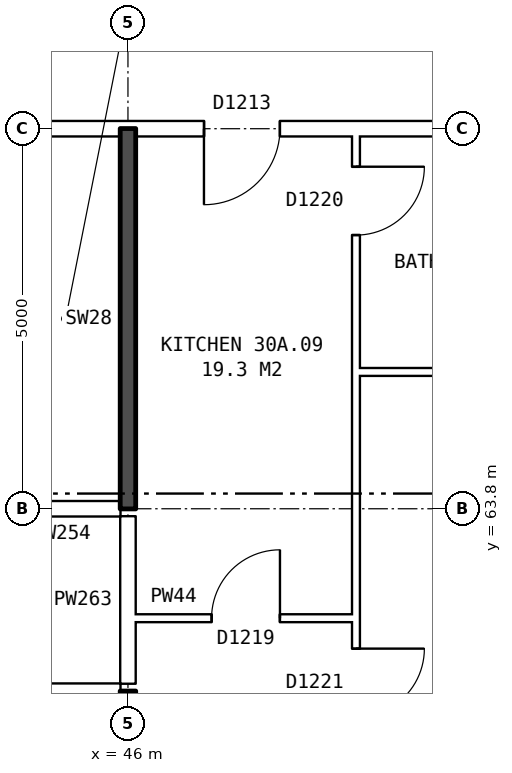
"""IFC4 building model, lengths in metres.
Left out: names, types, materials, properties, quantities, classifications, styles, units other than length and angle.
Written with IfcOpenShell. Run it as: python <this file> out.ifc"""

import sys

from ifc_helpers import new_model, si_unit, direction, frame, frame_2d, origin, place, context, subcontext, project, spatial, rectangle, extrude, element, fill, save


model = new_model("IFC4")
c1 = context("Model", 3, precision=1e-05, world=origin(), true_north=direction((0.0, 1.0)))
c2 = subcontext(c1, "Body", "Model", "MODEL_VIEW")
j1 = project(units=[si_unit("LENGTHUNIT", "METRE"), si_unit("PLANEANGLEUNIT", "RADIAN")], contexts=[c1])
p1 = place(None, origin())
s1 = spatial("IfcSite", under=j1, at=p1, CompositionType="ELEMENT")
p2 = place(p1, origin())
s2 = spatial("IfcBuilding", under=s1, at=p2, CompositionType="ELEMENT")
p3 = place(p2, frame((0.0, 0.0, 108.8)))
s3 = spatial("IfcBuildingStorey", under=s2, at=p3, CompositionType="ELEMENT", Elevation=108.8)
p4 = place(p3, frame((25.36, 61.4, 0.0), z_axis=(0.0, 0.0, 1.0), x_axis=(1.0, 0.0, 0.0)))
e1 = element("IfcWall", 1, at=p4, inside=s3, PredefinedType="PARTITIONING", context=c2, shape_type="SweptSolid", body=[
    extrude(rectangle(XDim=20.54, YDim=0.2, at=frame_2d((10.27, 0.0))), origin(), (0.0, 0.0, 1.0), 2.85),
])
p5 = place(p4, frame((15.94, 0.0, 0.0)))
e2 = element("IfcOpeningElement", 2, at=p5, cuts=e1, PredefinedType="OPENING", context=c2, shape_type="SweptSolid", body=[
    extrude(rectangle(XDim=1.0, YDim=2.1, at=frame_2d((0.5, 1.05))), frame((0.0, 0.11, 0.0), z_axis=(0.0, -1.0, 0.0), x_axis=(1.0, 0.0, 0.0)), (0.0, 0.0, 1.0), 0.22),
])
p6 = place(p4, frame((9.94, 0.0, 0.0)))
e3 = element("IfcOpeningElement", 3, at=p6, cuts=e1, PredefinedType="OPENING", context=c2, shape_type="SweptSolid", body=[
    extrude(rectangle(XDim=1.0, YDim=2.1, at=frame_2d((0.5, 1.05))), frame((0.0, 0.11, 0.0), z_axis=(0.0, -1.0, 0.0), x_axis=(1.0, 0.0, 0.0)), (0.0, 0.0, 1.0), 0.22),
])
p7 = place(p4, frame((2.62, 0.0, 0.0)))
e4 = element("IfcOpeningElement", 4, at=p7, cuts=e1, PredefinedType="OPENING", context=c2, shape_type="SweptSolid", body=[
    extrude(rectangle(XDim=1.0, YDim=2.1, at=frame_2d((0.5, 1.05))), frame((0.0, 0.11, 0.0), z_axis=(0.0, -1.0, 0.0), x_axis=(1.0, 0.0, 0.0)), (0.0, 0.0, 1.0), 0.22),
])
p8 = place(p3, frame((46.1, 62.36, 0.0), z_axis=(0.0, 0.0, 1.0), x_axis=(1.0, 0.0, 0.0)))
e5 = element("IfcWall", 5, at=p8, inside=s3, PredefinedType="PARTITIONING", context=c2, shape_type="SweptSolid", body=[
    extrude(rectangle(XDim=2.9, YDim=0.1, at=frame_2d((1.45, 0.0))), origin(), (0.0, 0.0, 1.0), 2.85),
])
p9 = place(p8, frame((1.0, 0.0, 0.0)))
e6 = element("IfcOpeningElement", 6, at=p9, cuts=e5, PredefinedType="OPENING", context=c2, shape_type="SweptSolid", body=[
    extrude(rectangle(XDim=0.9, YDim=2.1, at=frame_2d((0.45, 1.05))), frame((0.0, 0.06, 0.0), z_axis=(0.0, -1.0, 0.0), x_axis=(1.0, 0.0, 0.0)), (0.0, 0.0, 1.0), 0.12),
])
p10 = place(p3, frame((44.36, 63.8, 0.0), z_axis=(0.0, 0.0, 1.0), x_axis=(1.0, 0.0, 0.0)))
e7 = element("IfcWall", 7, at=p10, inside=s3, PredefinedType="PARTITIONING", context=c2, shape_type="SweptSolid", body=[
    extrude(rectangle(XDim=1.54, YDim=0.2, at=frame_2d((0.77, 0.0))), origin(), (0.0, 0.0, 1.0), 2.85),
])
p11 = place(p3, frame((49.0, 65.6, 0.0), z_axis=(0.0, 0.0, 1.0), x_axis=(1.0, 0.0, 0.0)))
e8 = element("IfcWall", 8, at=p11, inside=s3, PredefinedType="PARTITIONING", context=c2, shape_type="SweptSolid", body=[
    extrude(rectangle(XDim=6.0, YDim=0.1, at=frame_2d((3.0, 0.0))), origin(), (0.0, 0.0, 1.0), 2.85),
])
p12 = place(p3, frame((44.36, 68.8, 0.0), z_axis=(0.0, 0.0, 1.0), x_axis=(1.0, 0.0, 0.0)))
e9 = element("IfcWall", 9, at=p12, inside=s3, PredefinedType="PARTITIONING", context=c2, shape_type="SweptSolid", body=[
    extrude(rectangle(XDim=19.28, YDim=0.2, at=frame_2d((9.64, 0.0))), origin(), (0.0, 0.0, 1.0), 2.85),
])
p13 = place(p12, frame((17.46, 0.0, 0.0)))
e10 = element("IfcOpeningElement", 10, at=p13, cuts=e9, PredefinedType="OPENING", context=c2, shape_type="SweptSolid", body=[
    extrude(rectangle(XDim=1.0, YDim=2.1, at=frame_2d((0.5, 1.05))), frame((0.0, 0.11, 0.0), z_axis=(0.0, -1.0, 0.0), x_axis=(1.0, 0.0, 0.0)), (0.0, 0.0, 1.0), 0.22),
])
p14 = place(p12, frame((11.64, 0.0, 0.0)))
e11 = element("IfcOpeningElement", 11, at=p14, cuts=e9, PredefinedType="OPENING", context=c2, shape_type="SweptSolid", body=[
    extrude(rectangle(XDim=1.0, YDim=2.1, at=frame_2d((0.5, 1.05))), frame((0.0, 0.11, 0.0), z_axis=(0.0, -1.0, 0.0), x_axis=(1.0, 0.0, 0.0)), (0.0, 0.0, 1.0), 0.22),
])
p15 = place(p12, frame((2.64, 0.0, 0.0)))
e12 = element("IfcOpeningElement", 12, at=p15, cuts=e9, PredefinedType="OPENING", context=c2, shape_type="SweptSolid", body=[
    extrude(rectangle(XDim=1.0, YDim=2.1, at=frame_2d((0.5, 1.05))), frame((0.0, 0.11, 0.0), z_axis=(0.0, -1.0, 0.0), x_axis=(1.0, 0.0, 0.0)), (0.0, 0.0, 1.0), 0.22),
])
p16 = place(p3, frame((46.0, 54.36, 0.0), z_axis=(0.0, 0.0, 1.0), x_axis=(0.0, 1.0, 0.0)))
e13 = element("IfcWall", 13, at=p16, inside=s3, PredefinedType="SOLIDWALL", context=c2, shape_type="SweptSolid", body=[
    extrude(rectangle(XDim=7.04, YDim=0.2, at=frame_2d((3.52, 0.0))), origin(), (0.0, 0.0, 1.0), 2.85),
])
p17 = place(p3, frame((46.0, 61.5, 0.0), z_axis=(0.0, 0.0, 1.0), x_axis=(0.0, 1.0, 0.0)))
e14 = element("IfcWall", 14, at=p17, inside=s3, PredefinedType="PARTITIONING", context=c2, shape_type="SweptSolid", body=[
    extrude(rectangle(XDim=2.2, YDim=0.2, at=frame_2d((1.1, 0.0))), origin(), (0.0, 0.0, 1.0), 2.85),
])
p18 = place(p3, frame((46.0, 63.8, 0.0), z_axis=(0.0, 0.0, 1.0), x_axis=(0.0, 1.0, 0.0)))
e15 = element("IfcWall", 15, at=p18, inside=s3, PredefinedType="SOLIDWALL", context=c2, shape_type="SweptSolid", body=[
    extrude(rectangle(XDim=5.0, YDim=0.2, at=frame_2d((2.5, 0.0))), origin(), (0.0, 0.0, 1.0), 2.85),
])
p19 = place(p3, frame((49.0, 54.36, 0.0), z_axis=(0.0, 0.0, 1.0), x_axis=(0.0, 1.0, 0.0)))
e16 = element("IfcWall", 16, at=p19, inside=s3, PredefinedType="PARTITIONING", context=c2, shape_type="SweptSolid", body=[
    extrude(rectangle(XDim=14.34, YDim=0.1, at=frame_2d((7.17, 0.0))), origin(), (0.0, 0.0, 1.0), 2.85),
])
p20 = place(p19, frame((6.7, 0.0, 0.0)))
e17 = element("IfcOpeningElement", 17, at=p20, cuts=e16, PredefinedType="OPENING", context=c2, shape_type="SweptSolid", body=[
    extrude(rectangle(XDim=0.9, YDim=2.1, at=frame_2d((0.45, 1.05))), frame((0.0, 0.06, 0.0), z_axis=(0.0, -1.0, 0.0), x_axis=(1.0, 0.0, 0.0)), (0.0, 0.0, 1.0), 0.12),
])
p21 = place(p19, frame((13.04, 0.0, 0.0)))
e18 = element("IfcOpeningElement", 18, at=p21, cuts=e16, PredefinedType="OPENING", context=c2, shape_type="SweptSolid", body=[
    extrude(rectangle(XDim=0.9, YDim=2.1, at=frame_2d((0.45, 1.05))), frame((0.0, 0.06, 0.0), z_axis=(0.0, -1.0, 0.0), x_axis=(1.0, 0.0, 0.0)), (0.0, 0.0, 1.0), 0.12),
])
p22 = place(p20, frame((0.9, 0.0, 0.0), z_axis=(0.0, 0.0, 1.0), x_axis=(-1.0, 0.0, 0.0)))
e19 = element("IfcDoor", 19, at=p22, inside=s3, OperationType="SINGLE_SWING_LEFT", PredefinedType="DOOR", context=c2, shape_type="SweptSolid", body=[
    extrude(rectangle(XDim=0.9, YDim=2.1, at=frame_2d((0.45, 1.05))), frame((0.0, 0.025, 0.0), z_axis=(0.0, -1.0, 0.0), x_axis=(1.0, 0.0, 0.0)), (0.0, 0.0, 1.0), 0.05),
])
fill(e17, e19)
p23 = place(p15, frame((1.0, 0.0, 0.0), z_axis=(0.0, 0.0, 1.0), x_axis=(-1.0, 0.0, 0.0)))
e20 = element("IfcDoor", 20, at=p23, inside=s3, OperationType="SINGLE_SWING_RIGHT", PredefinedType="DOOR", context=c2, shape_type="SweptSolid", body=[
    extrude(rectangle(XDim=1.0, YDim=2.1, at=frame_2d((0.5, 1.05))), frame((0.0, 0.025, 0.0), z_axis=(0.0, -1.0, 0.0), x_axis=(1.0, 0.0, 0.0)), (0.0, 0.0, 1.0), 0.05),
])
fill(e12, e20)
p24 = place(p9, origin())
e21 = element("IfcDoor", 21, at=p24, inside=s3, OperationType="SINGLE_SWING_RIGHT", PredefinedType="DOOR", context=c2, shape_type="SweptSolid", body=[
    extrude(rectangle(XDim=0.9, YDim=2.1, at=frame_2d((0.45, 1.05))), frame((0.0, 0.025, 0.0), z_axis=(0.0, -1.0, 0.0), x_axis=(1.0, 0.0, 0.0)), (0.0, 0.0, 1.0), 0.05),
])
fill(e6, e21)
p25 = place(p21, frame((0.9, 0.0, 0.0), z_axis=(0.0, 0.0, 1.0), x_axis=(-1.0, 0.0, 0.0)))
e22 = element("IfcDoor", 22, at=p25, inside=s3, OperationType="SINGLE_SWING_LEFT", PredefinedType="DOOR", context=c2, shape_type="SweptSolid", body=[
    extrude(rectangle(XDim=0.9, YDim=2.1, at=frame_2d((0.45, 1.05))), frame((0.0, 0.025, 0.0), z_axis=(0.0, -1.0, 0.0), x_axis=(1.0, 0.0, 0.0)), (0.0, 0.0, 1.0), 0.05),
])
fill(e18, e22)
save(model, sys.argv[1])
